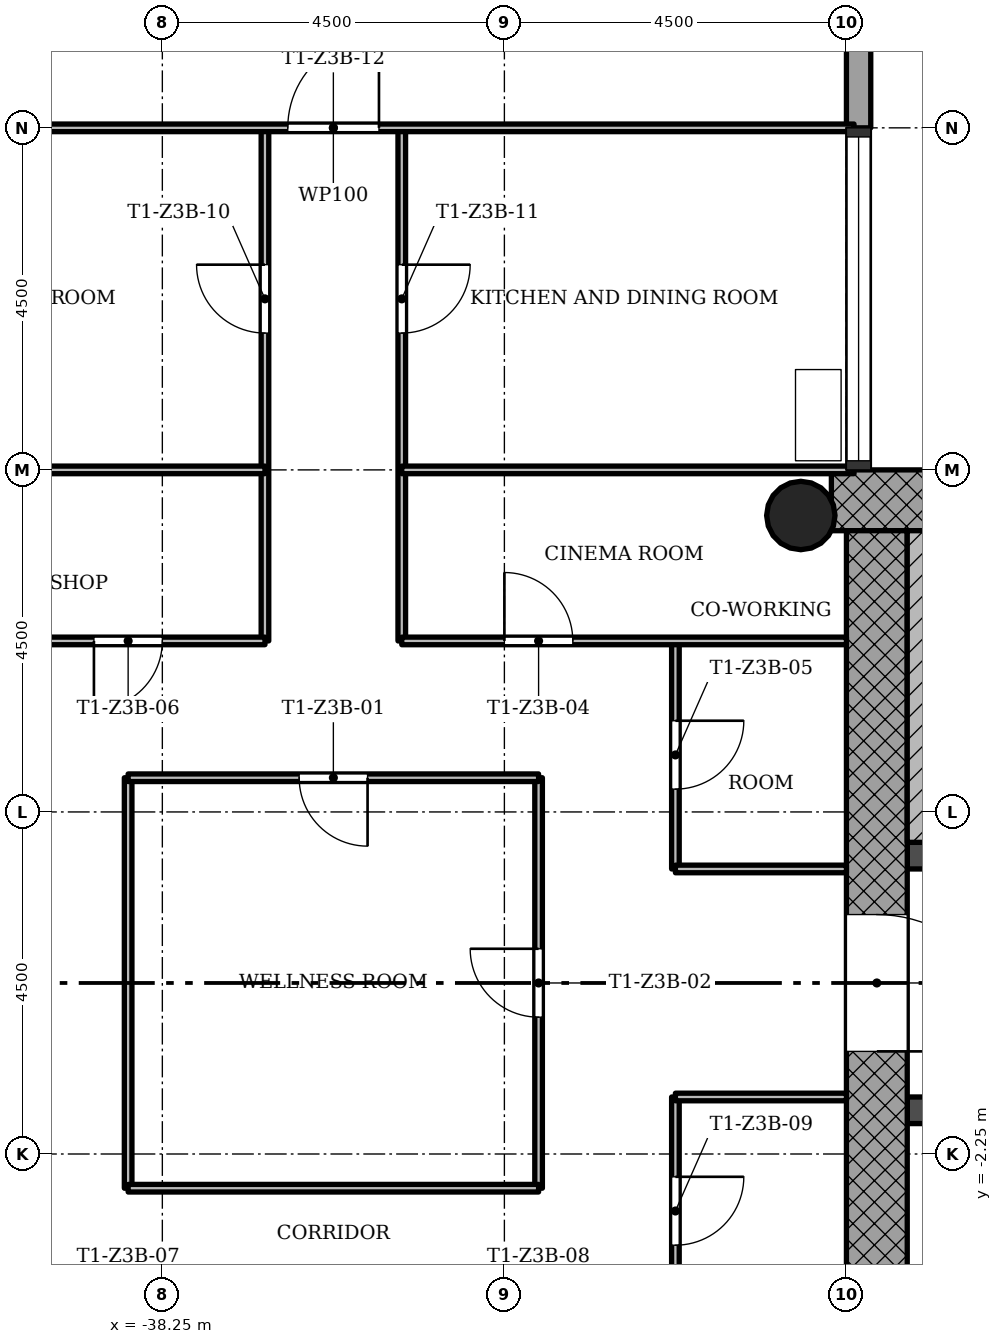
"""IFC4 building model, lengths in metres.
Left out: names, types, materials, properties, quantities, classifications, styles, units other than length and angle.
Written with IfcOpenShell. Run it as: python <this file> out.ifc"""

import sys

from ifc_helpers import new_model, si_unit, direction, frame, frame_2d, origin, origin_2d, place, context, subcontext, project, spatial, rectangle, hollow_circle, extrude, element, fill, save


model = new_model("IFC4")
c1 = context("Model", 3, precision=1e-05, world=origin(), true_north=direction((0.0, 1.0)))
c2 = subcontext(c1, "Body", "Model", "MODEL_VIEW")
j1 = project(units=[si_unit("LENGTHUNIT", "METRE"), si_unit("PLANEANGLEUNIT", "RADIAN")], contexts=[c1])
p1 = place(None, origin())
s1 = spatial("IfcSite", under=j1, at=p1, CompositionType="ELEMENT")
p2 = place(p1, origin())
s2 = spatial("IfcBuilding", under=s1, at=p2, CompositionType="ELEMENT")
p3 = place(p2, frame((0.0, 0.0, 150.7)))
s3 = spatial("IfcBuildingStorey", under=s2, at=p3, CompositionType="ELEMENT", Elevation=150.7)
p4 = place(p3, frame((-20.652, 6.35, 0.0), z_axis=(0.0, 0.0, 1.0), x_axis=(-1.0, 0.0, 0.0)))
e1 = element("IfcWall", 1, at=p4, inside=s3, PredefinedType="SHEAR", context=c2, shape_type="SweptSolid", body=[
    extrude(rectangle(XDim=8.796, YDim=0.8, at=frame_2d((4.398, 0.0))), origin(), (0.0, 0.0, 1.0), 3.4),
])
p5 = place(p3, frame((-28.85, 5.95, 0.0), z_axis=(0.0, 0.0, 1.0), x_axis=(0.0, -1.0, 0.0)))
e2 = element("IfcWall", 2, at=p5, inside=s3, PredefinedType="SHEAR", context=c2, shape_type="SweptSolid", body=[
    extrude(rectangle(XDim=12.7, YDim=0.8, at=frame_2d((6.35, 0.0))), origin(), (0.0, 0.0, 1.0), 3.4),
])
p6 = place(p5, frame((5.05, 0.0, 0.0)))
e3 = element("IfcOpeningElement", 3, at=p6, cuts=e2, PredefinedType="OPENING", context=c2, shape_type="SweptSolid", body=[
    extrude(rectangle(XDim=1.8, YDim=2.1, at=frame_2d((0.9, 1.05))), frame((0.0, 0.41, 0.0), z_axis=(0.0, -1.0, 0.0), x_axis=(1.0, 0.0, 0.0)), (0.0, 0.0, 1.0), 0.82),
])
p7 = place(p3, frame((-28.45, -1.675, 0.0), z_axis=(0.0, 0.0, 1.0), x_axis=(1.0, 0.0, 0.0)))
e4 = element("IfcWall", 4, at=p7, inside=s3, PredefinedType="SHEAR", context=c2, shape_type="SweptSolid", body=[
    extrude(rectangle(XDim=7.4, YDim=0.35, at=frame_2d((3.7, 0.0))), origin(), (0.0, 0.0, 1.0), 3.4),
])
p8 = place(p7, frame((0.95, 0.0, 0.0)))
e5 = element("IfcOpeningElement", 5, at=p8, cuts=e4, PredefinedType="OPENING", context=c2, shape_type="SweptSolid", body=[
    extrude(rectangle(XDim=1.1, YDim=2.1, at=frame_2d((0.55, 1.05))), frame((0.0, 0.185, 0.0), z_axis=(0.0, -1.0, 0.0), x_axis=(1.0, 0.0, 0.0)), (0.0, 0.0, 1.0), 0.37),
])
p9 = place(p7, frame((3.15, 0.0, 0.0)))
e6 = element("IfcOpeningElement", 6, at=p9, cuts=e4, PredefinedType="OPENING", context=c2, shape_type="SweptSolid", body=[
    extrude(rectangle(XDim=1.1, YDim=2.1, at=frame_2d((0.55, 1.05))), frame((0.0, 0.185, 0.0), z_axis=(0.0, -1.0, 0.0), x_axis=(1.0, 0.0, 0.0)), (0.0, 0.0, 1.0), 0.37),
])
p10 = place(p7, frame((5.35, 0.0, 0.0)))
e7 = element("IfcOpeningElement", 7, at=p10, cuts=e4, PredefinedType="OPENING", context=c2, shape_type="SweptSolid", body=[
    extrude(rectangle(XDim=1.1, YDim=2.1, at=frame_2d((0.55, 1.05))), frame((0.0, 0.185, 0.0), z_axis=(0.0, -1.0, 0.0), x_axis=(1.0, 0.0, 0.0)), (0.0, 0.0, 1.0), 0.37),
])
p11 = place(p3, frame((-28.45, 1.675, 0.0), z_axis=(0.0, 0.0, 1.0), x_axis=(1.0, 0.0, 0.0)))
e8 = element("IfcWall", 8, at=p11, inside=s3, PredefinedType="SHEAR", context=c2, shape_type="SweptSolid", body=[
    extrude(rectangle(XDim=7.4, YDim=0.35, at=frame_2d((3.7, 0.0))), origin(), (0.0, 0.0, 1.0), 3.4),
])
p12 = place(p11, frame((0.85, 0.0, 0.0)))
e9 = element("IfcOpeningElement", 9, at=p12, cuts=e8, PredefinedType="OPENING", context=c2, shape_type="SweptSolid", body=[
    extrude(rectangle(XDim=0.9, YDim=2.1, at=frame_2d((0.45, 1.05))), frame((0.0, 0.185, 0.0), z_axis=(0.0, -1.0, 0.0), x_axis=(1.0, 0.0, 0.0)), (0.0, 0.0, 1.0), 0.37),
])
p13 = place(p3, frame((-29.85, 6.15, 0.0), z_axis=(0.0, 0.0, 1.0), x_axis=(1.0, 0.0, 0.0)))
e10 = element("IfcColumn", 10, at=p13, inside=s3, PredefinedType="COLUMN", context=c2, shape_type="SweptSolid", body=[
    extrude(hollow_circle(Radius=0.45, WallThickness=0.032, at=origin_2d()), origin(), (0.0, 0.0, 1.0), 3.4),
])
p14 = place(p3, frame((-29.09, 11.25, -0.3), z_axis=(0.0, 0.0, 1.0), x_axis=(0.0, 1.0, 0.0)))
e11 = element("IfcWall", 11, at=p14, inside=s3, PredefinedType="STANDARD", context=c2, shape_type="SweptSolid", body=[
    extrude(rectangle(XDim=1.82, YDim=0.32, at=frame_2d((0.91, 0.0))), origin(), (0.0, 0.0, 1.0), 3.4),
])
p15 = place(p3, frame((-38.7, -2.7, 0.0), z_axis=(0.0, 0.0, 1.0), x_axis=(0.0, 1.0, 0.0)))
e12 = element("IfcWall", 12, at=p15, inside=s3, PredefinedType="PARTITIONING", context=c2, shape_type="SweptSolid", body=[
    extrude(rectangle(XDim=5.4, YDim=0.1, at=frame_2d((2.7, 0.0))), origin(), (0.0, 0.0, 1.0), 3.0),
])
p16 = place(p3, frame((-36.9, 4.5, 0.0), z_axis=(0.0, 0.0, 1.0), x_axis=(0.0, 1.0, 0.0)))
e13 = element("IfcWall", 13, at=p16, inside=s3, PredefinedType="PARTITIONING", context=c2, shape_type="SweptSolid", body=[
    extrude(rectangle(XDim=6.75, YDim=0.1, at=frame_2d((3.375, 0.0))), origin(), (0.0, 0.0, 1.0), 3.0),
])
p17 = place(p16, frame((4.05, 0.0, 0.0)))
e14 = element("IfcOpeningElement", 14, at=p17, cuts=e13, PredefinedType="OPENING", context=c2, shape_type="SweptSolid", body=[
    extrude(rectangle(XDim=0.9, YDim=2.1, at=frame_2d((0.45, 1.05))), frame((0.0, 0.06, 0.0), z_axis=(0.0, -1.0, 0.0), x_axis=(1.0, 0.0, 0.0)), (0.0, 0.0, 1.0), 0.12),
])
p18 = place(p3, frame((-35.1, 4.5, 0.0), z_axis=(0.0, 0.0, 1.0), x_axis=(0.0, 1.0, 0.0)))
e15 = element("IfcWall", 15, at=p18, inside=s3, PredefinedType="PARTITIONING", context=c2, shape_type="SweptSolid", body=[
    extrude(rectangle(XDim=6.75, YDim=0.1, at=frame_2d((3.375, 0.0))), origin(), (0.0, 0.0, 1.0), 3.0),
])
p19 = place(p18, frame((4.05, 0.0, 0.0)))
e16 = element("IfcOpeningElement", 16, at=p19, cuts=e15, PredefinedType="OPENING", context=c2, shape_type="SweptSolid", body=[
    extrude(rectangle(XDim=0.9, YDim=2.1, at=frame_2d((0.45, 1.05))), frame((0.0, 0.06, 0.0), z_axis=(0.0, -1.0, 0.0), x_axis=(1.0, 0.0, 0.0)), (0.0, 0.0, 1.0), 0.12),
])
p20 = place(p3, frame((-33.3, -2.7, 0.0), z_axis=(0.0, 0.0, 1.0), x_axis=(0.0, 1.0, 0.0)))
e17 = element("IfcWall", 17, at=p20, inside=s3, PredefinedType="PARTITIONING", context=c2, shape_type="SweptSolid", body=[
    extrude(rectangle(XDim=5.4, YDim=0.1, at=frame_2d((2.7, 0.0))), origin(), (0.0, 0.0, 1.0), 3.0),
])
p21 = place(p20, frame((2.25, 0.0, 0.0)))
e18 = element("IfcOpeningElement", 18, at=p21, cuts=e17, PredefinedType="OPENING", context=c2, shape_type="SweptSolid", body=[
    extrude(rectangle(XDim=0.9, YDim=2.1, at=frame_2d((0.45, 1.05))), frame((0.0, 0.06, 0.0), z_axis=(0.0, -1.0, 0.0), x_axis=(1.0, 0.0, 0.0)), (0.0, 0.0, 1.0), 0.12),
])
p22 = place(p3, frame((-31.5, -6.75, 0.0), z_axis=(0.0, 0.0, 1.0), x_axis=(0.0, 1.0, 0.0)))
e19 = element("IfcWall", 19, at=p22, inside=s3, PredefinedType="PARTITIONING", context=c2, shape_type="SweptSolid", body=[
    extrude(rectangle(XDim=5.25, YDim=0.1, at=frame_2d((2.625, 0.0))), origin(), (0.0, 0.0, 1.0), 3.0),
])
p23 = place(p22, frame((3.3, 0.0, 0.0)))
e20 = element("IfcOpeningElement", 20, at=p23, cuts=e19, PredefinedType="OPENING", context=c2, shape_type="SweptSolid", body=[
    extrude(rectangle(XDim=0.9, YDim=2.1, at=frame_2d((0.45, 1.05))), frame((0.0, 0.06, 0.0), z_axis=(0.0, -1.0, 0.0), x_axis=(1.0, 0.0, 0.0)), (0.0, 0.0, 1.0), 0.12),
])
p24 = place(p3, frame((-31.5, 1.5, 0.0), z_axis=(0.0, 0.0, 1.0), x_axis=(0.0, 1.0, 0.0)))
e21 = element("IfcWall", 21, at=p24, inside=s3, PredefinedType="PARTITIONING", context=c2, shape_type="SweptSolid", body=[
    extrude(rectangle(XDim=3.0, YDim=0.1, at=frame_2d((1.5, 0.0))), origin(), (0.0, 0.0, 1.0), 3.0),
])
p25 = place(p24, frame((1.05, 0.0, 0.0)))
e22 = element("IfcOpeningElement", 22, at=p25, cuts=e21, PredefinedType="OPENING", context=c2, shape_type="SweptSolid", body=[
    extrude(rectangle(XDim=0.9, YDim=2.1, at=frame_2d((0.45, 1.05))), frame((0.0, 0.06, 0.0), z_axis=(0.0, -1.0, 0.0), x_axis=(1.0, 0.0, 0.0)), (0.0, 0.0, 1.0), 0.12),
])
p26 = place(p3, frame((-38.7, -2.7, 0.0), z_axis=(0.0, 0.0, 1.0), x_axis=(1.0, 0.0, 0.0)))
e23 = element("IfcWall", 23, at=p26, inside=s3, PredefinedType="PARTITIONING", context=c2, shape_type="SweptSolid", body=[
    extrude(rectangle(XDim=5.4, YDim=0.1, at=frame_2d((2.7, 0.0))), origin(), (0.0, 0.0, 1.0), 3.0),
])
for number, where, z_axis, x_axis in (
    (24, (-31.5, -1.5, 0.0), (0.0, 0.0, 1.0), (1.0, 0.0, 0.0)),
    (25, (-31.5, 1.5, 0.0), (0.0, 0.0, 1.0), (1.0, 0.0, 0.0)),
):
    element("IfcWall", number, at=place(p3, frame(where, z_axis=z_axis, x_axis=x_axis)), inside=s3, PredefinedType="PARTITIONING", context=c2, shape_type="SweptSolid", body=[
        extrude(rectangle(XDim=2.25, YDim=0.1, at=frame_2d((1.125, 0.0))), origin(), (0.0, 0.0, 1.0), 3.0),
    ])
p27 = place(p3, frame((-38.7, 2.7, 0.0), z_axis=(0.0, 0.0, 1.0), x_axis=(1.0, 0.0, 0.0)))
e26 = element("IfcWall", 26, at=p27, inside=s3, PredefinedType="PARTITIONING", context=c2, shape_type="SweptSolid", body=[
    extrude(rectangle(XDim=5.4, YDim=0.1, at=frame_2d((2.7, 0.0))), origin(), (0.0, 0.0, 1.0), 3.0),
])
p28 = place(p27, frame((2.25, 0.0, 0.0)))
e27 = element("IfcOpeningElement", 27, at=p28, cuts=e26, PredefinedType="OPENING", context=c2, shape_type="SweptSolid", body=[
    extrude(rectangle(XDim=0.9, YDim=2.1, at=frame_2d((0.45, 1.05))), frame((0.0, 0.06, 0.0), z_axis=(0.0, -1.0, 0.0), x_axis=(1.0, 0.0, 0.0)), (0.0, 0.0, 1.0), 0.12),
])
p29 = place(p3, frame((-40.5, 4.5, 0.0), z_axis=(0.0, 0.0, 1.0), x_axis=(1.0, 0.0, 0.0)))
e28 = element("IfcWall", 28, at=p29, inside=s3, PredefinedType="PARTITIONING", context=c2, shape_type="SweptSolid", body=[
    extrude(rectangle(XDim=3.6, YDim=0.1, at=frame_2d((1.8, 0.0))), origin(), (0.0, 0.0, 1.0), 3.0),
])
p30 = place(p29, frame((1.35, 0.0, 0.0)))
e29 = element("IfcOpeningElement", 29, at=p30, cuts=e28, PredefinedType="OPENING", context=c2, shape_type="SweptSolid", body=[
    extrude(rectangle(XDim=0.9, YDim=2.1, at=frame_2d((0.45, 1.05))), frame((0.0, 0.06, 0.0), z_axis=(0.0, -1.0, 0.0), x_axis=(1.0, 0.0, 0.0)), (0.0, 0.0, 1.0), 0.12),
])
p31 = place(p3, frame((-35.1, 4.5, 0.0), z_axis=(0.0, 0.0, 1.0), x_axis=(1.0, 0.0, 0.0)))
e30 = element("IfcWall", 30, at=p31, inside=s3, PredefinedType="PARTITIONING", context=c2, shape_type="SweptSolid", body=[
    extrude(rectangle(XDim=5.85, YDim=0.1, at=frame_2d((2.925, 0.0))), origin(), (0.0, 0.0, 1.0), 3.0),
])
p32 = place(p31, frame((1.35, 0.0, 0.0)))
e31 = element("IfcOpeningElement", 31, at=p32, cuts=e30, PredefinedType="OPENING", context=c2, shape_type="SweptSolid", body=[
    extrude(rectangle(XDim=0.9, YDim=2.1, at=frame_2d((0.45, 1.05))), frame((0.0, 0.06, 0.0), z_axis=(0.0, -1.0, 0.0), x_axis=(1.0, 0.0, 0.0)), (0.0, 0.0, 1.0), 0.12),
])
for number, where, z_axis, x_axis in (
    (32, (-42.85, 6.75, 0.0), (0.0, 0.0, 1.0), (1.0, 0.0, 0.0)),
    (33, (-35.1, 6.75, 0.0), (0.0, 0.0, 1.0), (1.0, 0.0, 0.0)),
):
    element("IfcWall", number, at=place(p3, frame(where, z_axis=z_axis, x_axis=x_axis)), inside=s3, PredefinedType="PARTITIONING", context=c2, shape_type="SweptSolid", body=[
        extrude(rectangle(XDim=5.95, YDim=0.1, at=frame_2d((2.975, 0.0))), origin(), (0.0, 0.0, 1.0), 3.0),
    ])
p33 = place(p3, frame((-42.85, 11.25, 0.0), z_axis=(0.0, 0.0, 1.0), x_axis=(1.0, 0.0, 0.0)))
e34 = element("IfcWall", 34, at=p33, inside=s3, PredefinedType="PARTITIONING", context=c2, shape_type="SweptSolid", body=[
    extrude(rectangle(XDim=13.7, YDim=0.1, at=frame_2d((6.85, 0.0))), origin(), (0.0, 0.0, 1.0), 3.0),
])
p34 = place(p33, frame((6.25, 0.0, 0.0)))
e35 = element("IfcOpeningElement", 35, at=p34, cuts=e34, PredefinedType="OPENING", context=c2, shape_type="SweptSolid", body=[
    extrude(rectangle(XDim=1.2, YDim=2.1, at=frame_2d((0.6, 1.05))), frame((0.0, 0.06, 0.0), z_axis=(0.0, -1.0, 0.0), x_axis=(1.0, 0.0, 0.0)), (0.0, 0.0, 1.0), 0.12),
])
p35 = place(p3, frame((-28.25, 1.85, 0.0), z_axis=(0.0, 0.0, 1.0), x_axis=(0.0, 1.0, 0.0)))
e36 = element("IfcWall", 36, at=p35, inside=s3, PredefinedType="SHEAR", context=c2, shape_type="SweptSolid", body=[
    extrude(rectangle(XDim=4.1, YDim=0.4, at=frame_2d((2.05, 0.0))), origin(), (0.0, 0.0, 1.0), 3.4),
])
p36 = place(p28, origin())
e37 = element("IfcDoor", 37, at=p36, inside=s3, OperationType="SINGLE_SWING_RIGHT", PredefinedType="DOOR", context=c2, shape_type="SweptSolid", body=[
    extrude(rectangle(XDim=0.9, YDim=2.1, at=frame_2d((0.45, 1.05))), frame((0.0, 0.025, 0.0), z_axis=(0.0, -1.0, 0.0), x_axis=(1.0, 0.0, 0.0)), (0.0, 0.0, 1.0), 0.05),
])
fill(e27, e37)
p37 = place(p21, origin())
e38 = element("IfcDoor", 38, at=p37, inside=s3, OperationType="SINGLE_SWING_LEFT", PredefinedType="DOOR", context=c2, shape_type="SweptSolid", body=[
    extrude(rectangle(XDim=0.9, YDim=2.1, at=frame_2d((0.45, 1.05))), frame((0.0, 0.025, 0.0), z_axis=(0.0, -1.0, 0.0), x_axis=(1.0, 0.0, 0.0)), (0.0, 0.0, 1.0), 0.05),
])
fill(e18, e38)
p38 = place(p32, origin())
e39 = element("IfcDoor", 39, at=p38, inside=s3, OperationType="SINGLE_SWING_RIGHT", PredefinedType="DOOR", context=c2, shape_type="SweptSolid", body=[
    extrude(rectangle(XDim=0.9, YDim=2.1, at=frame_2d((0.45, 1.05))), frame((0.0, 0.025, 0.0), z_axis=(0.0, -1.0, 0.0), x_axis=(1.0, 0.0, 0.0)), (0.0, 0.0, 1.0), 0.05),
])
fill(e31, e39)
p39 = place(p25, origin())
e40 = element("IfcDoor", 40, at=p39, inside=s3, OperationType="SINGLE_SWING_RIGHT", PredefinedType="DOOR", context=c2, shape_type="SweptSolid", body=[
    extrude(rectangle(XDim=0.9, YDim=2.1, at=frame_2d((0.45, 1.05))), frame((0.0, 0.025, 0.0), z_axis=(0.0, -1.0, 0.0), x_axis=(1.0, 0.0, 0.0)), (0.0, 0.0, 1.0), 0.05),
])
fill(e22, e40)
p40 = place(p30, origin())
e41 = element("IfcDoor", 41, at=p40, inside=s3, OperationType="SINGLE_SWING_LEFT", PredefinedType="DOOR", context=c2, shape_type="SweptSolid", body=[
    extrude(rectangle(XDim=0.9, YDim=2.1, at=frame_2d((0.45, 1.05))), frame((0.0, 0.025, 0.0), z_axis=(0.0, -1.0, 0.0), x_axis=(1.0, 0.0, 0.0)), (0.0, 0.0, 1.0), 0.05),
])
fill(e29, e41)
p41 = place(p23, origin())
e42 = element("IfcDoor", 42, at=p41, inside=s3, OperationType="SINGLE_SWING_RIGHT", PredefinedType="DOOR", context=c2, shape_type="SweptSolid", body=[
    extrude(rectangle(XDim=0.9, YDim=2.1, at=frame_2d((0.45, 1.05))), frame((0.0, 0.025, 0.0), z_axis=(0.0, -1.0, 0.0), x_axis=(1.0, 0.0, 0.0)), (0.0, 0.0, 1.0), 0.05),
])
fill(e20, e42)
p42 = place(p17, origin())
e43 = element("IfcDoor", 43, at=p42, inside=s3, OperationType="SINGLE_SWING_LEFT", PredefinedType="DOOR", context=c2, shape_type="SweptSolid", body=[
    extrude(rectangle(XDim=0.9, YDim=2.1, at=frame_2d((0.45, 1.05))), frame((0.0, 0.025, 0.0), z_axis=(0.0, -1.0, 0.0), x_axis=(1.0, 0.0, 0.0)), (0.0, 0.0, 1.0), 0.05),
])
fill(e14, e43)
p43 = place(p19, origin())
e44 = element("IfcDoor", 44, at=p43, inside=s3, OperationType="SINGLE_SWING_RIGHT", PredefinedType="DOOR", context=c2, shape_type="SweptSolid", body=[
    extrude(rectangle(XDim=0.9, YDim=2.1, at=frame_2d((0.45, 1.05))), frame((0.0, 0.025, 0.0), z_axis=(0.0, -1.0, 0.0), x_axis=(1.0, 0.0, 0.0)), (0.0, 0.0, 1.0), 0.05),
])
fill(e16, e44)
p44 = place(p34, origin())
e45 = element("IfcDoor", 45, at=p44, inside=s3, OperationType="SINGLE_SWING_LEFT", PredefinedType="DOOR", context=c2, shape_type="SweptSolid", body=[
    extrude(rectangle(XDim=1.2, YDim=2.1, at=frame_2d((0.6, 1.05))), frame((0.0, 0.025, 0.0), z_axis=(0.0, -1.0, 0.0), x_axis=(1.0, 0.0, 0.0)), (0.0, 0.0, 1.0), 0.05),
])
fill(e35, e45)
p45 = place(p6, origin())
e46 = element("IfcDoor", 46, at=p45, inside=s3, OperationType="SINGLE_SWING_LEFT", PredefinedType="DOOR", context=c2, shape_type="SweptSolid", body=[
    extrude(rectangle(XDim=1.8, YDim=2.1, at=frame_2d((0.9, 1.05))), frame((0.0, 0.025, 0.0), z_axis=(0.0, -1.0, 0.0), x_axis=(1.0, 0.0, 0.0)), (0.0, 0.0, 1.0), 0.05),
])
fill(e3, e46)
save(model, sys.argv[1])
